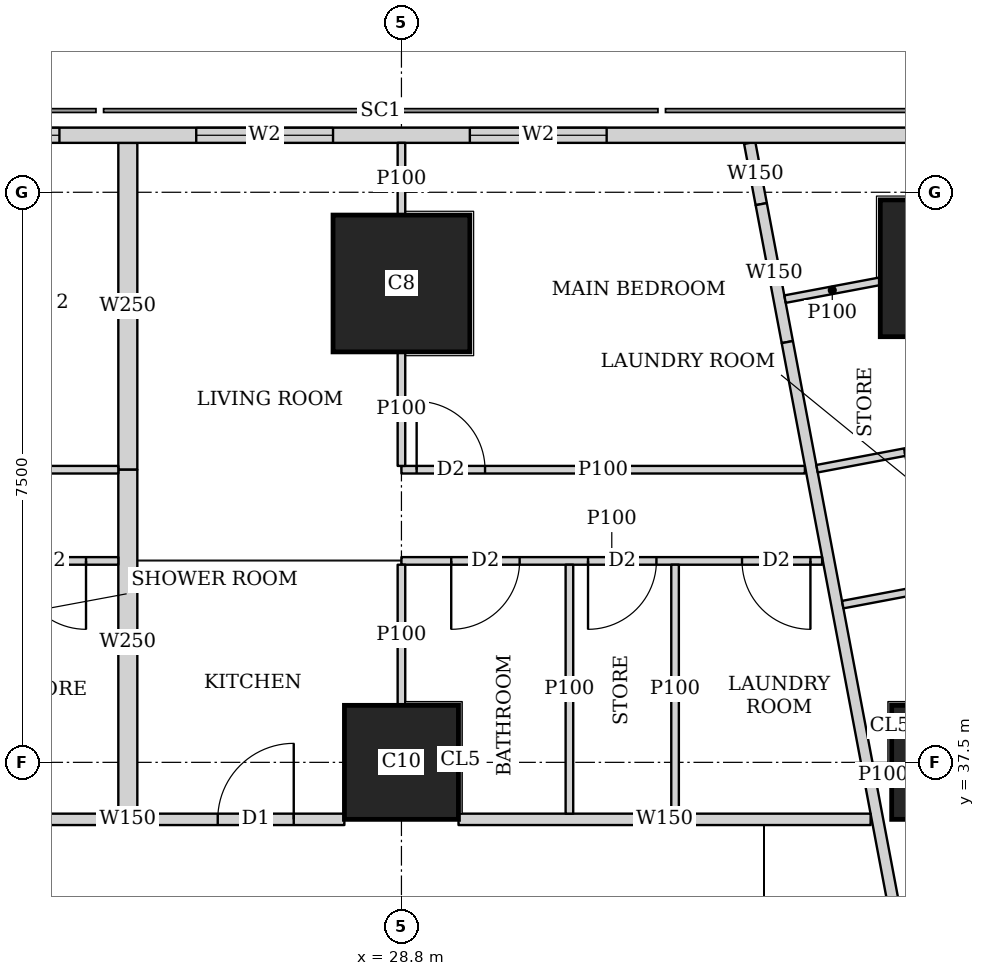
"""IFC4 building model, lengths in metres.
Left out: names, types, materials, properties, quantities, classifications, styles, units other than length and angle.
Written with IfcOpenShell. Run it as: python <this file> out.ifc"""

import sys

from ifc_helpers import new_model, si_unit, direction, frame, frame_2d, origin, origin_2d, place, context, subcontext, project, spatial, rectangle, extrude, element, fill, save


model = new_model("IFC4")
c1 = context("Model", 3, precision=1e-05, world=origin(), true_north=direction((0.0, 1.0)))
c2 = subcontext(c1, "Body", "Model", "MODEL_VIEW")
j1 = project(units=[si_unit("LENGTHUNIT", "METRE"), si_unit("PLANEANGLEUNIT", "RADIAN")], contexts=[c1])
p1 = place(None, origin())
s1 = spatial("IfcSite", under=j1, at=p1, CompositionType="ELEMENT")
p2 = place(p1, origin())
s2 = spatial("IfcBuilding", under=s1, at=p2, CompositionType="ELEMENT")
p3 = place(p2, frame((0.0, 0.0, 147.05)))
s3 = spatial("IfcBuildingStorey", under=s2, at=p3, CompositionType="ELEMENT", Elevation=147.05)
for number, where, z_axis, x_axis in (
    (1, (28.8, 37.5, 0.0), (0.0, 0.0, 1.0), (1.0, 0.0, 0.0)),
    (2, (36.0, 37.5, 0.0), (0.0, 0.0, 1.0), (1.0, 0.0, 0.0)),
):
    element("IfcColumn", number, at=place(p3, frame(where, z_axis=z_axis, x_axis=x_axis)), inside=s3, PredefinedType="COLUMN", context=c2, shape_type="SweptSolid", body=[
        extrude(rectangle(XDim=1.5, YDim=1.5, at=origin_2d()), origin(), (0.0, 0.0, 1.0), 3.75),
    ])
for number, where, z_axis, x_axis in (
    (3, (28.8, 43.8, 0.0), (0.0, 0.0, 1.0), (1.0, 0.0, 0.0)),
    (4, (36.0, 44.0, 0.0), (0.0, 0.0, 1.0), (1.0, 0.0, 0.0)),
):
    element("IfcColumn", number, at=place(p3, frame(where, z_axis=z_axis, x_axis=x_axis)), inside=s3, PredefinedType="COLUMN", context=c2, shape_type="SweptSolid", body=[
        extrude(rectangle(XDim=1.8, YDim=1.8, at=origin_2d()), origin(), (0.0, 0.0, 1.0), 3.75),
    ])
p4 = place(p3, frame((40.106, 45.75, 0.0), z_axis=(0.0, 0.0, 1.0), x_axis=(-1.0, 0.0, 0.0)))
e5 = element("IfcWall", 5, at=p4, inside=s3, PredefinedType="SOLIDWALL", context=c2, shape_type="SweptSolid", body=[
    extrude(rectangle(XDim=37.943, YDim=0.2, at=frame_2d((18.971, 0.0))), origin(), (0.0, 0.0, 1.0), 3.5),
])
p5 = place(p4, frame((8.606, 0.0, 0.9)))
e6 = element("IfcOpeningElement", 6, at=p5, cuts=e5, PredefinedType="OPENING", context=c2, shape_type="SweptSolid", body=[
    extrude(rectangle(XDim=1.8, YDim=1.5, at=frame_2d((0.9, 0.75))), frame((0.0, 0.11, 0.0), z_axis=(0.0, -1.0, 0.0), x_axis=(1.0, 0.0, 0.0)), (0.0, 0.0, 1.0), 0.22),
])
p6 = place(p4, frame((12.206, 0.0, 0.9)))
e7 = element("IfcOpeningElement", 7, at=p6, cuts=e5, PredefinedType="OPENING", context=c2, shape_type="SweptSolid", body=[
    extrude(rectangle(XDim=1.8, YDim=1.5, at=frame_2d((0.9, 0.75))), frame((0.0, 0.11, 0.0), z_axis=(0.0, -1.0, 0.0), x_axis=(1.0, 0.0, 0.0)), (0.0, 0.0, 1.0), 0.22),
])
p7 = place(p4, frame((15.806, 0.0, 0.9)))
e8 = element("IfcOpeningElement", 8, at=p7, cuts=e5, PredefinedType="OPENING", context=c2, shape_type="SweptSolid", body=[
    extrude(rectangle(XDim=1.8, YDim=1.5, at=frame_2d((0.9, 0.75))), frame((0.0, 0.11, 0.0), z_axis=(0.0, -1.0, 0.0), x_axis=(1.0, 0.0, 0.0)), (0.0, 0.0, 1.0), 0.22),
])
p8 = place(p4, frame((19.406, 0.0, 0.9)))
e9 = element("IfcOpeningElement", 9, at=p8, cuts=e5, PredefinedType="OPENING", context=c2, shape_type="SweptSolid", body=[
    extrude(rectangle(XDim=1.8, YDim=1.5, at=frame_2d((0.9, 0.75))), frame((0.0, 0.11, 0.0), z_axis=(0.0, -1.0, 0.0), x_axis=(1.0, 0.0, 0.0)), (0.0, 0.0, 1.0), 0.22),
])
p9 = place(p4, frame((23.006, 0.0, 0.9)))
e10 = element("IfcOpeningElement", 10, at=p9, cuts=e5, PredefinedType="OPENING", context=c2, shape_type="SweptSolid", body=[
    extrude(rectangle(XDim=1.8, YDim=1.5, at=frame_2d((0.9, 0.75))), frame((0.0, 0.11, 0.0), z_axis=(0.0, -1.0, 0.0), x_axis=(1.0, 0.0, 0.0)), (0.0, 0.0, 1.0), 0.22),
])
p10 = place(p4, frame((26.606, 0.0, 0.9)))
e11 = element("IfcOpeningElement", 11, at=p10, cuts=e5, PredefinedType="OPENING", context=c2, shape_type="SweptSolid", body=[
    extrude(rectangle(XDim=1.8, YDim=1.5, at=frame_2d((0.9, 0.75))), frame((0.0, 0.11, 0.0), z_axis=(0.0, -1.0, 0.0), x_axis=(1.0, 0.0, 0.0)), (0.0, 0.0, 1.0), 0.22),
])
p11 = place(p3, frame((22.351, 36.75, 0.0), z_axis=(0.0, 0.0, 1.0), x_axis=(1.0, 0.0, 0.0)))
e12 = element("IfcWall", 12, at=p11, inside=s3, PredefinedType="SOLIDWALL", context=c2, shape_type="SweptSolid", body=[
    extrude(rectangle(XDim=5.698, YDim=0.15, at=frame_2d((2.849, 0.0))), origin(), (0.0, 0.0, 1.0), 3.5),
])
p12 = place(p11, frame((4.032, 0.0, 0.0)))
e13 = element("IfcOpeningElement", 13, at=p12, cuts=e12, PredefinedType="OPENING", context=c2, shape_type="SweptSolid", body=[
    extrude(rectangle(XDim=1.0, YDim=2.1, at=frame_2d((0.5, 1.05))), frame((0.0, 0.085, 0.0), z_axis=(0.0, -1.0, 0.0), x_axis=(1.0, 0.0, 0.0)), (0.0, 0.0, 1.0), 0.17),
])
p13 = place(p3, frame((29.551, 36.75, 0.0), z_axis=(0.0, 0.0, 1.0), x_axis=(1.0, 0.0, 0.0)))
e14 = element("IfcWall", 14, at=p13, inside=s3, PredefinedType="SOLIDWALL", context=c2, shape_type="SweptSolid", body=[
    extrude(rectangle(XDim=5.422, YDim=0.15, at=frame_2d((2.711, 0.0))), origin(), (0.0, 0.0, 1.0), 3.5),
])
p14 = place(p3, frame((33.382, 45.65, 0.0), z_axis=(0.0, 0.0, 1.0), x_axis=(0.185169202764, -0.982706653253, 0.0)))
e15 = element("IfcWall", 15, at=p14, inside=s3, PredefinedType="SOLIDWALL", context=c2, shape_type="SweptSolid", body=[
    extrude(rectangle(XDim=0.82, YDim=0.15, at=frame_2d((0.41, 0.0))), origin(), (0.0, 0.0, 1.0), 3.5),
])
p15 = place(p3, frame((33.534, 44.844, 0.0), z_axis=(0.0, 0.0, 1.0), x_axis=(0.185708872674, -0.982604811005, 0.0)))
e16 = element("IfcWall", 16, at=p15, inside=s3, PredefinedType="SOLIDWALL", context=c2, shape_type="SweptSolid", body=[
    extrude(rectangle(XDim=1.847, YDim=0.15, at=frame_2d((0.924, 0.0))), origin(), (0.0, 0.0, 1.0), 2.1),
])
p16 = place(p3, frame((33.877, 43.029, 0.0), z_axis=(0.0, 0.0, 1.0), x_axis=(0.185596841028, -0.98262597798, 0.0)))
e17 = element("IfcWall", 17, at=p16, inside=s3, PredefinedType="SOLIDWALL", context=c2, shape_type="SweptSolid", body=[
    extrude(rectangle(XDim=41.66, YDim=0.15, at=frame_2d((20.83, 0.0))), origin(), (0.0, 0.0, 1.0), 2.5),
])
p17 = place(p16, frame((12.57, 0.0, 0.0)))
e18 = element("IfcOpeningElement", 18, at=p17, cuts=e17, PredefinedType="OPENING", context=c2, shape_type="SweptSolid", body=[
    extrude(rectangle(XDim=1.0, YDim=2.1, at=frame_2d((0.5, 1.05))), frame((0.0, 0.085, 0.0), z_axis=(0.0, -1.0, 0.0), x_axis=(1.0, 0.0, 0.0)), (0.0, 0.0, 1.0), 0.17),
])
p18 = place(p16, frame((16.386, 0.0, 0.0)))
e19 = element("IfcOpeningElement", 19, at=p18, cuts=e17, PredefinedType="OPENING", context=c2, shape_type="SweptSolid", body=[
    extrude(rectangle(XDim=1.0, YDim=2.1, at=frame_2d((0.5, 1.05))), frame((0.0, 0.085, 0.0), z_axis=(0.0, -1.0, 0.0), x_axis=(1.0, 0.0, 0.0)), (0.0, 0.0, 1.0), 0.17),
])
p19 = place(p16, frame((31.166, 0.0, 0.0)))
e20 = element("IfcOpeningElement", 20, at=p19, cuts=e17, PredefinedType="OPENING", context=c2, shape_type="SweptSolid", body=[
    extrude(rectangle(XDim=1.0, YDim=2.1, at=frame_2d((0.5, 1.05))), frame((0.0, 0.085, 0.0), z_axis=(0.0, -1.0, 0.0), x_axis=(1.0, 0.0, 0.0)), (0.0, 0.0, 1.0), 0.17),
])
p20 = place(p3, frame((35.09, 43.828, 0.0), z_axis=(0.0, 0.0, 1.0), x_axis=(-0.982758384778, -0.184894448668, 0.0)))
e21 = element("IfcWall", 21, at=p20, inside=s3, PredefinedType="PARTITIONING", context=c2, shape_type="SweptSolid", body=[
    extrude(rectangle(XDim=1.265, YDim=0.1, at=frame_2d((0.632, 0.0))), origin(), (0.0, 0.0, 1.0), 2.1),
])
p21 = place(p3, frame((37.823, 40.182, 0.0), z_axis=(0.0, 0.0, 1.0), x_axis=(-0.982664729897, -0.18539155487, 0.0)))
e22 = element("IfcWall", 22, at=p21, inside=s3, PredefinedType="PARTITIONING", context=c2, shape_type="SweptSolid", body=[
    extrude(rectangle(XDim=3.274, YDim=0.1, at=frame_2d((1.637, 0.0))), origin(), (0.0, 0.0, 1.0), 3.5),
])
p22 = place(p3, frame((35.24, 37.356, 0.0), z_axis=(0.0, 0.0, 1.0), x_axis=(-0.982819911474, -0.184567119526, 0.0)))
e23 = element("IfcWall", 23, at=p22, inside=s3, PredefinedType="PARTITIONING", context=c2, shape_type="SweptSolid", body=[
    extrude(rectangle(XDim=0.212, YDim=0.1, at=frame_2d((0.106, 0.0))), origin(), (0.0, 0.0, 1.0), 3.5),
])
p23 = place(p3, frame((37.486, 41.971, 0.0), z_axis=(0.0, 0.0, 1.0), x_axis=(-0.982620626894, -0.185625169636, 0.0)))
e24 = element("IfcWall", 24, at=p23, inside=s3, PredefinedType="PARTITIONING", context=c2, shape_type="SweptSolid", body=[
    extrude(rectangle(XDim=3.275, YDim=0.1, at=frame_2d((1.637, 0.0))), origin(), (0.0, 0.0, 1.0), 3.5),
])
p24 = place(p23, frame((1.201, 0.0, 0.0)))
e25 = element("IfcOpeningElement", 25, at=p24, cuts=e24, PredefinedType="OPENING", context=c2, shape_type="SweptSolid", body=[
    extrude(rectangle(XDim=0.9, YDim=2.1, at=frame_2d((0.45, 1.05))), frame((0.0, 0.06, 0.0), z_axis=(0.0, -1.0, 0.0), x_axis=(1.0, 0.0, 0.0)), (0.0, 0.0, 1.0), 0.12),
])
p25 = place(p3, frame((18.0, 41.35, 0.0), z_axis=(0.0, 0.0, 1.0), x_axis=(1.0, 0.0, 0.0)))
e26 = element("IfcWall", 26, at=p25, inside=s3, PredefinedType="PARTITIONING", context=c2, shape_type="SweptSolid", body=[
    extrude(rectangle(XDim=7.075, YDim=0.1, at=frame_2d((3.538, 0.0))), origin(), (0.0, 0.0, 1.0), 3.5),
])
p26 = place(p25, frame((0.2, 0.0, 0.0)))
e27 = element("IfcOpeningElement", 27, at=p26, cuts=e26, PredefinedType="OPENING", context=c2, shape_type="SweptSolid", body=[
    extrude(rectangle(XDim=0.9, YDim=2.1, at=frame_2d((0.45, 1.05))), frame((0.0, 0.06, 0.0), z_axis=(0.0, -1.0, 0.0), x_axis=(1.0, 0.0, 0.0)), (0.0, 0.0, 1.0), 0.12),
])
p27 = place(p25, frame((3.8, 0.0, 0.0)))
e28 = element("IfcOpeningElement", 28, at=p27, cuts=e26, PredefinedType="OPENING", context=c2, shape_type="SweptSolid", body=[
    extrude(rectangle(XDim=0.9, YDim=2.1, at=frame_2d((0.45, 1.05))), frame((0.0, 0.06, 0.0), z_axis=(0.0, -1.0, 0.0), x_axis=(1.0, 0.0, 0.0)), (0.0, 0.0, 1.0), 0.12),
])
p28 = place(p3, frame((18.0, 40.15, 0.0), z_axis=(0.0, 0.0, 1.0), x_axis=(1.0, 0.0, 0.0)))
e29 = element("IfcWall", 29, at=p28, inside=s3, PredefinedType="PARTITIONING", context=c2, shape_type="SweptSolid", body=[
    extrude(rectangle(XDim=7.075, YDim=0.1, at=frame_2d((3.538, 0.0))), origin(), (0.0, 0.0, 1.0), 3.5),
])
p29 = place(p28, frame((0.655, 0.0, 0.0)))
e30 = element("IfcOpeningElement", 30, at=p29, cuts=e29, PredefinedType="OPENING", context=c2, shape_type="SweptSolid", body=[
    extrude(rectangle(XDim=0.9, YDim=2.1, at=frame_2d((0.45, 1.05))), frame((0.0, 0.06, 0.0), z_axis=(0.0, -1.0, 0.0), x_axis=(1.0, 0.0, 0.0)), (0.0, 0.0, 1.0), 0.12),
])
p30 = place(p28, frame((3.95, 0.0, 0.0)))
e31 = element("IfcOpeningElement", 31, at=p30, cuts=e29, PredefinedType="OPENING", context=c2, shape_type="SweptSolid", body=[
    extrude(rectangle(XDim=0.9, YDim=2.1, at=frame_2d((0.45, 1.05))), frame((0.0, 0.06, 0.0), z_axis=(0.0, -1.0, 0.0), x_axis=(1.0, 0.0, 0.0)), (0.0, 0.0, 1.0), 0.12),
])
p31 = place(p28, frame((2.455, 0.0, 0.0)))
e32 = element("IfcOpeningElement", 32, at=p31, cuts=e29, PredefinedType="OPENING", context=c2, shape_type="SweptSolid", body=[
    extrude(rectangle(XDim=0.9, YDim=2.1, at=frame_2d((0.45, 1.05))), frame((0.0, 0.06, 0.0), z_axis=(0.0, -1.0, 0.0), x_axis=(1.0, 0.0, 0.0)), (0.0, 0.0, 1.0), 0.12),
])
p32 = place(p28, frame((5.75, 0.0, 0.0)))
e33 = element("IfcOpeningElement", 33, at=p32, cuts=e29, PredefinedType="OPENING", context=c2, shape_type="SweptSolid", body=[
    extrude(rectangle(XDim=0.9, YDim=2.1, at=frame_2d((0.45, 1.05))), frame((0.0, 0.06, 0.0), z_axis=(0.0, -1.0, 0.0), x_axis=(1.0, 0.0, 0.0)), (0.0, 0.0, 1.0), 0.12),
])
p33 = place(p3, frame((28.8, 41.35, 0.0), z_axis=(0.0, 0.0, 1.0), x_axis=(1.0, 0.0, 0.0)))
e34 = element("IfcWall", 34, at=p33, inside=s3, PredefinedType="PARTITIONING", context=c2, shape_type="SweptSolid", body=[
    extrude(rectangle(XDim=5.308, YDim=0.1, at=frame_2d((2.654, 0.0))), origin(), (0.0, 0.0, 1.0), 3.5),
])
p34 = place(p33, frame((0.2, 0.0, 0.0)))
e35 = element("IfcOpeningElement", 35, at=p34, cuts=e34, PredefinedType="OPENING", context=c2, shape_type="SweptSolid", body=[
    extrude(rectangle(XDim=0.9, YDim=2.1, at=frame_2d((0.45, 1.05))), frame((0.0, 0.06, 0.0), z_axis=(0.0, -1.0, 0.0), x_axis=(1.0, 0.0, 0.0)), (0.0, 0.0, 1.0), 0.12),
])
p35 = place(p3, frame((28.8, 40.15, 0.0), z_axis=(0.0, 0.0, 1.0), x_axis=(1.0, 0.0, 0.0)))
e36 = element("IfcWall", 36, at=p35, inside=s3, PredefinedType="PARTITIONING", context=c2, shape_type="SweptSolid", body=[
    extrude(rectangle(XDim=5.535, YDim=0.1, at=frame_2d((2.768, 0.0))), origin(), (0.0, 0.0, 1.0), 3.5),
])
p36 = place(p35, frame((0.655, 0.0, 0.0)))
e37 = element("IfcOpeningElement", 37, at=p36, cuts=e36, PredefinedType="OPENING", context=c2, shape_type="SweptSolid", body=[
    extrude(rectangle(XDim=0.9, YDim=2.1, at=frame_2d((0.45, 1.05))), frame((0.0, 0.06, 0.0), z_axis=(0.0, -1.0, 0.0), x_axis=(1.0, 0.0, 0.0)), (0.0, 0.0, 1.0), 0.12),
])
p37 = place(p35, frame((4.481, 0.0, 0.0)))
e38 = element("IfcOpeningElement", 38, at=p37, cuts=e36, PredefinedType="OPENING", context=c2, shape_type="SweptSolid", body=[
    extrude(rectangle(XDim=0.9, YDim=2.1, at=frame_2d((0.45, 1.05))), frame((0.0, 0.06, 0.0), z_axis=(0.0, -1.0, 0.0), x_axis=(1.0, 0.0, 0.0)), (0.0, 0.0, 1.0), 0.12),
])
p38 = place(p35, frame((2.455, 0.0, 0.0)))
e39 = element("IfcOpeningElement", 39, at=p38, cuts=e36, PredefinedType="OPENING", context=c2, shape_type="SweptSolid", body=[
    extrude(rectangle(XDim=0.9, YDim=2.1, at=frame_2d((0.45, 1.05))), frame((0.0, 0.06, 0.0), z_axis=(0.0, -1.0, 0.0), x_axis=(1.0, 0.0, 0.0)), (0.0, 0.0, 1.0), 0.12),
])
p39 = place(p3, frame((28.8, 41.4, 0.0), z_axis=(0.0, 0.0, 1.0), x_axis=(0.0, 1.0, 0.0)))
e40 = element("IfcWall", 40, at=p39, inside=s3, PredefinedType="PARTITIONING", context=c2, shape_type="SweptSolid", body=[
    extrude(rectangle(XDim=1.499, YDim=0.1, at=frame_2d((0.75, 0.0))), origin(), (0.0, 0.0, 1.0), 3.5),
])
p40 = place(p3, frame((28.8, 44.701, 0.0), z_axis=(0.0, 0.0, 1.0), x_axis=(0.0, 1.0, 0.0)))
e41 = element("IfcWall", 41, at=p40, inside=s3, PredefinedType="PARTITIONING", context=c2, shape_type="SweptSolid", body=[
    extrude(rectangle(XDim=0.949, YDim=0.1, at=frame_2d((0.475, 0.0))), origin(), (0.0, 0.0, 1.0), 3.5),
])
p41 = place(p3, frame((28.8, 38.251, 0.0), z_axis=(0.0, 0.0, 1.0), x_axis=(0.0, 1.0, 0.0)))
e42 = element("IfcWall", 42, at=p41, inside=s3, PredefinedType="PARTITIONING", context=c2, shape_type="SweptSolid", body=[
    extrude(rectangle(XDim=1.849, YDim=0.1, at=frame_2d((0.925, 0.0))), origin(), (0.0, 0.0, 1.0), 3.5),
])
for number, where, z_axis, x_axis in (
    (43, (32.4, 36.825, 0.0), (0.0, 0.0, 1.0), (0.0, 1.0, 0.0)),
    (44, (31.01, 36.825, 0.0), (0.0, 0.0, 1.0), (0.0, 1.0, 0.0)),
):
    element("IfcWall", number, at=place(p3, frame(where, z_axis=z_axis, x_axis=x_axis)), inside=s3, PredefinedType="PARTITIONING", context=c2, shape_type="SweptSolid", body=[
        extrude(rectangle(XDim=3.275, YDim=0.1, at=frame_2d((1.638, 0.0))), origin(), (0.0, 0.0, 1.0), 3.5),
    ])
p42 = place(p3, frame((25.2, 41.35, 0.0), z_axis=(0.0, 0.0, 1.0), x_axis=(0.0, 1.0, 0.0)))
e45 = element("IfcWall", 45, at=p42, inside=s3, PredefinedType="SOLIDWALL", context=c2, shape_type="SweptSolid", body=[
    extrude(rectangle(XDim=4.3, YDim=0.25, at=frame_2d((2.15, 0.0))), origin(), (0.0, 0.0, 1.0), 2.1),
])
p43 = place(p3, frame((25.2, 36.825, 0.0), z_axis=(0.0, 0.0, 1.0), x_axis=(0.0, 1.0, 0.0)))
e46 = element("IfcWall", 46, at=p43, inside=s3, PredefinedType="SOLIDWALL", context=c2, shape_type="SweptSolid", body=[
    extrude(rectangle(XDim=4.525, YDim=0.25, at=frame_2d((2.263, 0.0))), origin(), (0.0, 0.0, 1.0), 3.5),
])
p44 = place(p5, origin())
e47 = element("IfcWindow", 47, at=p44, inside=s3, PartitioningType="SINGLE_PANEL", PredefinedType="WINDOW", context=c2, shape_type="SweptSolid", body=[
    extrude(rectangle(XDim=1.8, YDim=1.5, at=frame_2d((0.9, 0.75))), frame((0.0, 0.03, 0.0), z_axis=(0.0, -1.0, 0.0), x_axis=(1.0, 0.0, 0.0)), (0.0, 0.0, 1.0), 0.06),
])
fill(e6, e47)
p45 = place(p6, origin())
e48 = element("IfcWindow", 48, at=p45, inside=s3, PartitioningType="SINGLE_PANEL", PredefinedType="WINDOW", context=c2, shape_type="SweptSolid", body=[
    extrude(rectangle(XDim=1.8, YDim=1.5, at=frame_2d((0.9, 0.75))), frame((0.0, 0.03, 0.0), z_axis=(0.0, -1.0, 0.0), x_axis=(1.0, 0.0, 0.0)), (0.0, 0.0, 1.0), 0.06),
])
fill(e7, e48)
p46 = place(p7, origin())
e49 = element("IfcWindow", 49, at=p46, inside=s3, PartitioningType="SINGLE_PANEL", PredefinedType="WINDOW", context=c2, shape_type="SweptSolid", body=[
    extrude(rectangle(XDim=1.8, YDim=1.5, at=frame_2d((0.9, 0.75))), frame((0.0, 0.03, 0.0), z_axis=(0.0, -1.0, 0.0), x_axis=(1.0, 0.0, 0.0)), (0.0, 0.0, 1.0), 0.06),
])
fill(e8, e49)
p47 = place(p24, origin())
e50 = element("IfcDoor", 50, at=p47, inside=s3, OperationType="SINGLE_SWING_RIGHT", PredefinedType="DOOR", context=c2, shape_type="SweptSolid", body=[
    extrude(rectangle(XDim=0.9, YDim=2.1, at=frame_2d((0.45, 1.05))), frame((0.0, 0.025, 0.0), z_axis=(0.0, -1.0, 0.0), x_axis=(1.0, 0.0, 0.0)), (0.0, 0.0, 1.0), 0.05),
])
fill(e25, e50)
p48 = place(p32, origin())
e51 = element("IfcDoor", 51, at=p48, inside=s3, OperationType="SINGLE_SWING_LEFT", PredefinedType="DOOR", context=c2, shape_type="SweptSolid", body=[
    extrude(rectangle(XDim=0.9, YDim=2.1, at=frame_2d((0.45, 1.05))), frame((0.0, 0.025, 0.0), z_axis=(0.0, -1.0, 0.0), x_axis=(1.0, 0.0, 0.0)), (0.0, 0.0, 1.0), 0.05),
])
fill(e33, e51)
p49 = place(p34, origin())
e52 = element("IfcDoor", 52, at=p49, inside=s3, OperationType="SINGLE_SWING_LEFT", PredefinedType="DOOR", context=c2, shape_type="SweptSolid", body=[
    extrude(rectangle(XDim=0.9, YDim=2.1, at=frame_2d((0.45, 1.05))), frame((0.0, 0.025, 0.0), z_axis=(0.0, -1.0, 0.0), x_axis=(1.0, 0.0, 0.0)), (0.0, 0.0, 1.0), 0.05),
])
fill(e35, e52)
p50 = place(p36, origin())
e53 = element("IfcDoor", 53, at=p50, inside=s3, OperationType="SINGLE_SWING_RIGHT", PredefinedType="DOOR", context=c2, shape_type="SweptSolid", body=[
    extrude(rectangle(XDim=0.9, YDim=2.1, at=frame_2d((0.45, 1.05))), frame((0.0, 0.025, 0.0), z_axis=(0.0, -1.0, 0.0), x_axis=(1.0, 0.0, 0.0)), (0.0, 0.0, 1.0), 0.05),
])
fill(e37, e53)
p51 = place(p37, origin())
e54 = element("IfcDoor", 54, at=p51, inside=s3, OperationType="SINGLE_SWING_LEFT", PredefinedType="DOOR", context=c2, shape_type="SweptSolid", body=[
    extrude(rectangle(XDim=0.9, YDim=2.1, at=frame_2d((0.45, 1.05))), frame((0.0, 0.025, 0.0), z_axis=(0.0, -1.0, 0.0), x_axis=(1.0, 0.0, 0.0)), (0.0, 0.0, 1.0), 0.05),
])
fill(e38, e54)
p52 = place(p38, origin())
e55 = element("IfcDoor", 55, at=p52, inside=s3, OperationType="SINGLE_SWING_RIGHT", PredefinedType="DOOR", context=c2, shape_type="SweptSolid", body=[
    extrude(rectangle(XDim=0.9, YDim=2.1, at=frame_2d((0.45, 1.05))), frame((0.0, 0.025, 0.0), z_axis=(0.0, -1.0, 0.0), x_axis=(1.0, 0.0, 0.0)), (0.0, 0.0, 1.0), 0.05),
])
fill(e39, e55)
p53 = place(p12, origin())
e56 = element("IfcDoor", 56, at=p53, inside=s3, OperationType="SINGLE_SWING_RIGHT", PredefinedType="DOOR", context=c2, shape_type="SweptSolid", body=[
    extrude(rectangle(XDim=1.0, YDim=2.1, at=frame_2d((0.5, 1.05))), frame((0.0, 0.025, 0.0), z_axis=(0.0, -1.0, 0.0), x_axis=(1.0, 0.0, 0.0)), (0.0, 0.0, 1.0), 0.05),
])
fill(e13, e56)
save(model, sys.argv[1])
